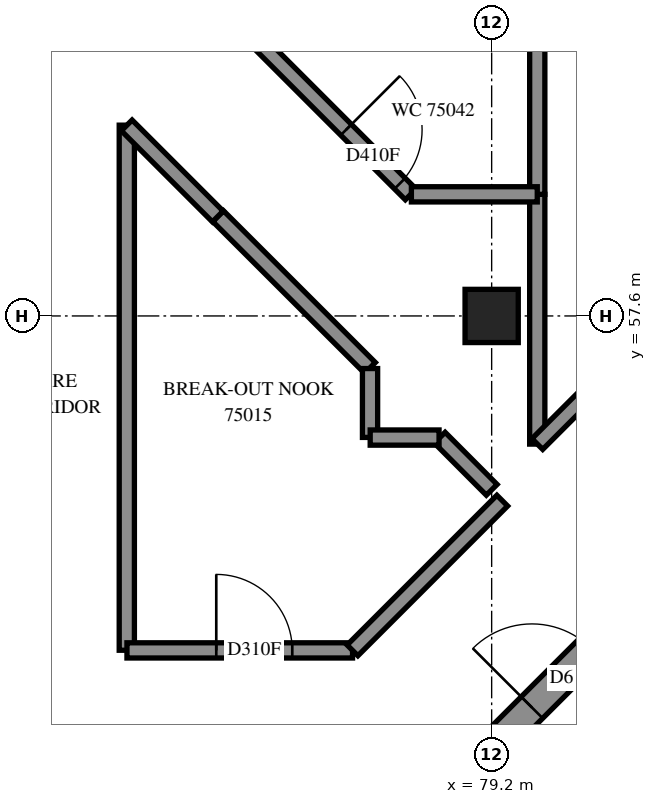
"""IFC4 building model, lengths in metres.
Left out: names, types, materials, properties, quantities, classifications, styles, units other than length and angle.
Written with IfcOpenShell. Run it as: python <this file> out.ifc"""

import sys

from ifc_helpers import new_model, si_unit, direction, frame, frame_2d, origin, origin_2d, place, context, subcontext, project, spatial, rectangle, extrude, element, fill, save


model = new_model("IFC4")
c1 = context("Model", 3, precision=1e-05, world=origin(), true_north=direction((0.0, 1.0)))
c2 = subcontext(c1, "Body", "Model", "MODEL_VIEW")
j1 = project(units=[si_unit("LENGTHUNIT", "METRE"), si_unit("PLANEANGLEUNIT", "RADIAN")], contexts=[c1])
p1 = place(None, origin())
s1 = spatial("IfcSite", under=j1, at=p1, CompositionType="ELEMENT")
p2 = place(p1, origin())
s2 = spatial("IfcBuilding", under=s1, at=p2, CompositionType="ELEMENT")
p3 = place(p2, frame((0.0, 0.0, 274.4)))
s3 = spatial("IfcBuildingStorey", under=s2, at=p3, CompositionType="ELEMENT", Elevation=274.4)
p4 = place(p3, frame((79.2, 57.6, 0.0), z_axis=(0.0, 0.0, 1.0), x_axis=(1.0, 0.0, 0.0)))
e1 = element("IfcColumn", 1, at=p4, inside=s3, PredefinedType="COLUMN", context=c2, shape_type="SweptSolid", body=[
    extrude(rectangle(XDim=0.7, YDim=0.7, at=origin_2d()), origin(), (0.0, 0.0, 1.0), 3.1),
])
p5 = place(p3, frame((76.513, 49.231, -0.3), z_axis=(0.0, 0.0, 1.0), x_axis=(0.7071067812, 0.7071067812, 0.0)))
e2 = element("IfcWall", 2, at=p5, inside=s3, PredefinedType="SHEAR", context=c2, shape_type="SweptSolid", body=[
    extrude(rectangle(XDim=14.4, YDim=0.4, at=frame_2d((7.2, 0.0))), origin(), (0.0, 0.0, 1.0), 2.7),
])
p6 = place(p5, frame((4.55, 0.0, 0.3)))
e3 = element("IfcOpeningElement", 3, at=p6, cuts=e2, PredefinedType="OPENING", context=c2, shape_type="SweptSolid", body=[
    extrude(rectangle(XDim=1.1, YDim=2.1, at=frame_2d((0.55, 1.05))), frame((0.0, 0.21, 0.0), z_axis=(0.0, -1.0, 0.0), x_axis=(1.0, 0.0, 0.0)), (0.0, 0.0, 1.0), 0.42),
])
p7 = place(p5, frame((11.35, 0.0, 0.3)))
e4 = element("IfcOpeningElement", 4, at=p7, cuts=e2, PredefinedType="OPENING", context=c2, shape_type="SweptSolid", body=[
    extrude(rectangle(XDim=1.1, YDim=2.1, at=frame_2d((0.55, 1.05))), frame((0.0, 0.21, 0.0), z_axis=(0.0, -1.0, 0.0), x_axis=(1.0, 0.0, 0.0)), (0.0, 0.0, 1.0), 0.42),
])
p8 = place(p3, frame((74.4, 53.202, 0.0), z_axis=(0.0, 0.0, 1.0), x_axis=(0.0, 1.0, 0.0)))
e5 = element("IfcWall", 5, at=p8, inside=s3, PredefinedType="PARTITIONING", context=c2, shape_type="SweptSolid", body=[
    extrude(rectangle(XDim=6.908, YDim=0.2, at=frame_2d((3.454, 0.0))), origin(), (0.0, 0.0, 1.0), 3.1),
])
p9 = place(p3, frame((79.8, 55.914, 0.0), z_axis=(0.0, 0.0, 1.0), x_axis=(0.0, 1.0, 0.0)))
e6 = element("IfcWall", 6, at=p9, inside=s3, PredefinedType="PARTITIONING", context=c2, shape_type="SweptSolid", body=[
    extrude(rectangle(XDim=3.286, YDim=0.2, at=frame_2d((1.643, 0.0))), origin(), (0.0, 0.0, 1.0), 3.1),
])
p10 = place(p3, frame((79.8, 59.2, 0.0), z_axis=(0.0, 0.0, 1.0), x_axis=(0.0, 1.0, 0.0)))
e7 = element("IfcWall", 7, at=p10, inside=s3, PredefinedType="PARTITIONING", context=c2, shape_type="SweptSolid", body=[
    extrude(rectangle(XDim=3.014, YDim=0.2, at=frame_2d((1.507, 0.0))), origin(), (0.0, 0.0, 1.0), 3.1),
])
p11 = place(p3, frame((76.009, 61.325, 0.0), z_axis=(0.0, 0.0, 1.0), x_axis=(0.7071067812, -0.7071067812, 0.0)))
e8 = element("IfcWall", 8, at=p11, inside=s3, PredefinedType="PARTITIONING", context=c2, shape_type="SweptSolid", body=[
    extrude(rectangle(XDim=3.007, YDim=0.2, at=frame_2d((1.503, 0.0))), origin(), (0.0, 0.0, 1.0), 3.1),
])
p12 = place(p11, frame((1.804, 0.0, 0.0)))
e9 = element("IfcOpeningElement", 9, at=p12, cuts=e8, PredefinedType="OPENING", context=c2, shape_type="SweptSolid", body=[
    extrude(rectangle(XDim=1.0, YDim=2.1, at=frame_2d((0.5, 1.05))), frame((0.0, 0.11, 0.0), z_axis=(0.0, -1.0, 0.0), x_axis=(1.0, 0.0, 0.0)), (0.0, 0.0, 1.0), 0.22),
])
p13 = place(p3, frame((74.402, 53.2, 0.0), z_axis=(0.0, 0.0, 1.0), x_axis=(1.0, 0.0, 0.0)))
e10 = element("IfcWall", 10, at=p13, inside=s3, PredefinedType="PARTITIONING", context=c2, shape_type="SweptSolid", body=[
    extrude(rectangle(XDim=2.968, YDim=0.2, at=frame_2d((1.484, 0.0))), origin(), (0.0, 0.0, 1.0), 3.1),
])
p14 = place(p13, frame((1.175, 0.0, 0.0)))
e11 = element("IfcOpeningElement", 11, at=p14, cuts=e10, PredefinedType="OPENING", context=c2, shape_type="SweptSolid", body=[
    extrude(rectangle(XDim=1.0, YDim=2.1, at=frame_2d((0.5, 1.05))), frame((0.0, 0.11, 0.0), z_axis=(0.0, -1.0, 0.0), x_axis=(1.0, 0.0, 0.0)), (0.0, 0.0, 1.0), 0.22),
])
p15 = place(p3, frame((75.601, 58.913, 0.0), z_axis=(0.0, 0.0, 1.0), x_axis=(0.707460777, -0.7067526081, 0.0)))
e12 = element("IfcWall", 12, at=p15, inside=s3, PredefinedType="PARTITIONING", context=c2, shape_type="SweptSolid", body=[
    extrude(rectangle(XDim=2.824, YDim=0.2, at=frame_2d((1.412, 0.0))), origin(), (0.0, 0.0, 1.0), 3.1),
])
p16 = place(p3, frame((77.37, 53.2, 0.0), z_axis=(0.0, 0.0, 1.0), x_axis=(0.7071067812, 0.7071067812, 0.0)))
e13 = element("IfcWall", 13, at=p16, inside=s3, PredefinedType="PARTITIONING", context=c2, shape_type="SweptSolid", body=[
    extrude(rectangle(XDim=2.786, YDim=0.2, at=frame_2d((1.393, 0.0))), origin(), (0.0, 0.0, 1.0), 3.1),
])
p17 = place(p3, frame((74.399, 60.107, 0.0), z_axis=(0.0, 0.0, 1.0), x_axis=(0.7071067812, -0.7071067812, 0.0)))
e14 = element("IfcWall", 14, at=p17, inside=s3, PredefinedType="PARTITIONING", context=c2, shape_type="SweptSolid", body=[
    extrude(rectangle(XDim=1.694, YDim=0.2, at=frame_2d((0.847, 0.0))), origin(), (0.0, 0.0, 1.0), 3.1),
])
p18 = place(p3, frame((78.144, 59.2, 0.0), z_axis=(0.0, 0.0, 1.0), x_axis=(1.0, 0.0, 0.0)))
e15 = element("IfcWall", 15, at=p18, inside=s3, PredefinedType="PARTITIONING", context=c2, shape_type="SweptSolid", body=[
    extrude(rectangle(XDim=1.656, YDim=0.2, at=frame_2d((0.828, 0.0))), origin(), (0.0, 0.0, 1.0), 3.1),
])
p19 = place(p3, frame((79.801, 55.915, 0.0), z_axis=(0.0, 0.0, 1.0), x_axis=(0.7071067812, 0.7071067812, 0.0)))
e16 = element("IfcWall", 16, at=p19, inside=s3, PredefinedType="PARTITIONING", context=c2, shape_type="SweptSolid", body=[
    extrude(rectangle(XDim=1.411, YDim=0.2, at=frame_2d((0.706, 0.0))), origin(), (0.0, 0.0, 1.0), 3.1),
])
p20 = place(p3, frame((78.517, 55.999, 0.0), z_axis=(0.0, 0.0, 1.0), x_axis=(0.7060737561, -0.7081382993, 0.0)))
e17 = element("IfcWall", 17, at=p20, inside=s3, PredefinedType="PARTITIONING", context=c2, shape_type="SweptSolid", body=[
    extrude(rectangle(XDim=0.969, YDim=0.2, at=frame_2d((0.484, 0.0))), origin(), (0.0, 0.0, 1.0), 3.1),
])
for number, where, z_axis, x_axis in (
    (18, (77.6, 56.002, 0.0), (0.0, 0.0, 1.0), (0.0, 1.0, 0.0)),
    (19, (77.602, 56.0, 0.0), (0.0, 0.0, 1.0), (1.0, 0.0, 0.0)),
):
    element("IfcWall", number, at=place(p3, frame(where, z_axis=z_axis, x_axis=x_axis)), inside=s3, PredefinedType="PARTITIONING", context=c2, shape_type="SweptSolid", body=[
        extrude(rectangle(XDim=0.906, YDim=0.2, at=frame_2d((0.453, 0.0))), origin(), (0.0, 0.0, 1.0), 3.1),
    ])
p21 = place(p6, origin())
e20 = element("IfcDoor", 20, at=p21, inside=s3, OperationType="DOUBLE_DOOR_SINGLE_SWING", PredefinedType="DOOR", context=c2, shape_type="SweptSolid", body=[
    extrude(rectangle(XDim=1.1, YDim=2.1, at=frame_2d((0.55, 1.05))), frame((0.0, 0.025, 0.0), z_axis=(0.0, -1.0, 0.0), x_axis=(1.0, 0.0, 0.0)), (0.0, 0.0, 1.0), 0.05),
])
fill(e3, e20)
p22 = place(p14, origin())
e21 = element("IfcDoor", 21, at=p22, inside=s3, OperationType="SINGLE_SWING_LEFT", PredefinedType="DOOR", context=c2, shape_type="SweptSolid", body=[
    extrude(rectangle(XDim=1.0, YDim=2.1, at=frame_2d((0.5, 1.05))), frame((0.0, 0.025, 0.0), z_axis=(0.0, -1.0, 0.0), x_axis=(1.0, 0.0, 0.0)), (0.0, 0.0, 1.0), 0.05),
])
fill(e11, e21)
p23 = place(p12, origin())
e22 = element("IfcDoor", 22, at=p23, inside=s3, OperationType="SINGLE_SWING_LEFT", PredefinedType="DOOR", context=c2, shape_type="SweptSolid", body=[
    extrude(rectangle(XDim=1.0, YDim=2.1, at=frame_2d((0.5, 1.05))), frame((0.0, 0.025, 0.0), z_axis=(0.0, -1.0, 0.0), x_axis=(1.0, 0.0, 0.0)), (0.0, 0.0, 1.0), 0.05),
])
fill(e9, e22)
save(model, sys.argv[1])
